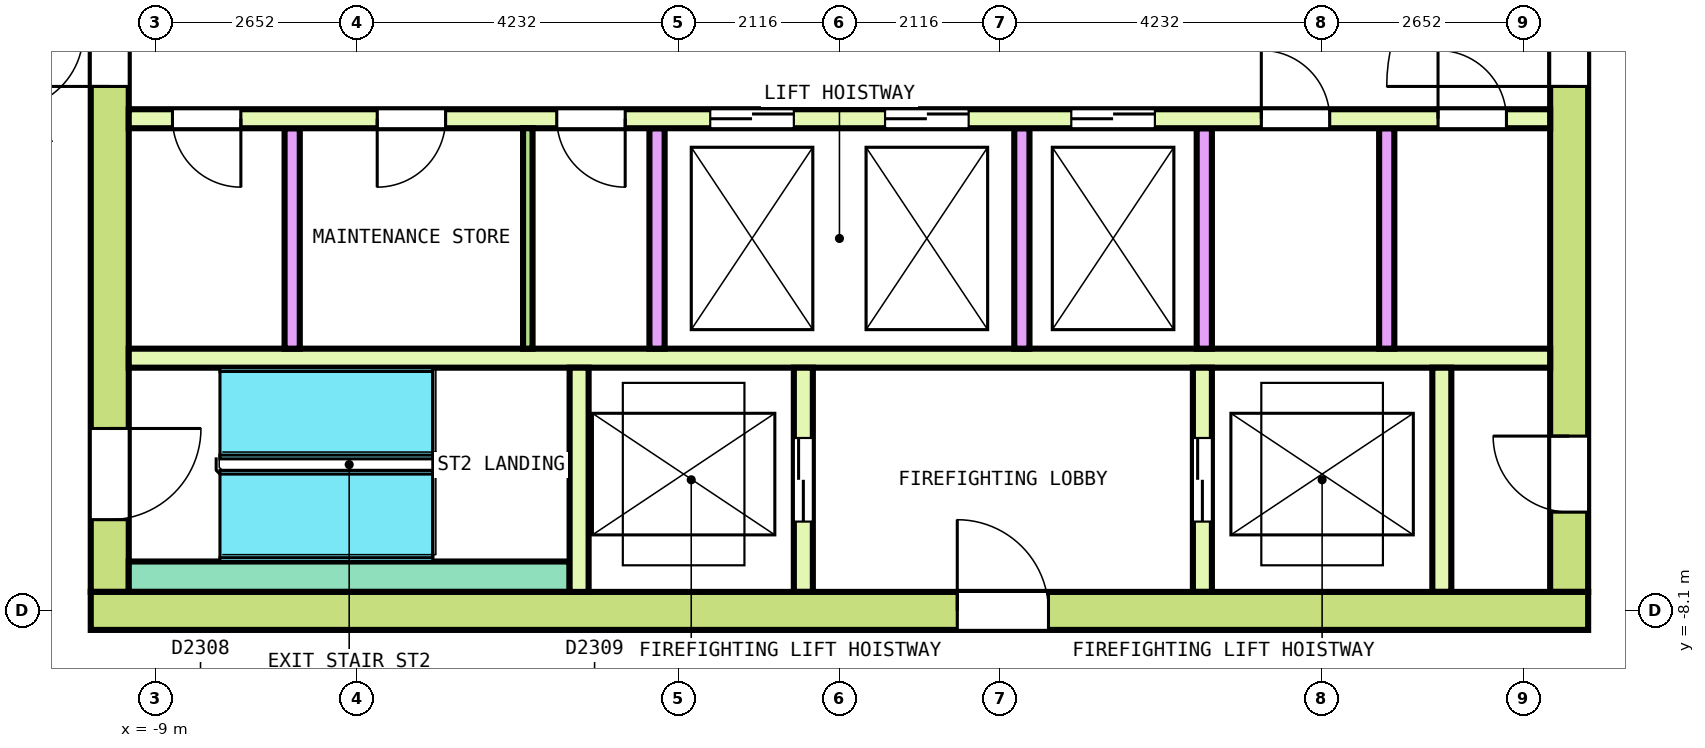
"""IFC4 building model, lengths in metres.
Left out: names, types, materials, properties, quantities, classifications, styles, units other than length and angle.
Written with IfcOpenShell. Run it as: python <this file> out.ifc"""

import sys

from ifc_helpers import new_model, si_unit, direction, frame, frame_2d, origin, place, context, subcontext, project, spatial, rectangle, extrude, element, fill, save


model = new_model("IFC4")
c1 = context("Model", 3, precision=1e-05, world=origin(), true_north=direction((0.0, 1.0)))
c2 = subcontext(c1, "Body", "Model", "MODEL_VIEW")
j1 = project(units=[si_unit("LENGTHUNIT", "METRE"), si_unit("PLANEANGLEUNIT", "RADIAN")], contexts=[c1])
p1 = place(None, origin())
s1 = spatial("IfcSite", under=j1, at=p1, CompositionType="ELEMENT")
p2 = place(p1, origin())
s2 = spatial("IfcBuilding", under=s1, at=p2, CompositionType="ELEMENT")
p3 = place(p2, frame((0.0, 0.0, 312.6)))
s3 = spatial("IfcBuildingStorey", under=s2, at=p3, CompositionType="ELEMENT", Elevation=312.6)
p4 = place(p3, frame((-9.85, -8.1, 0.0), z_axis=(0.0, 0.0, 1.0), x_axis=(1.0, 0.0, 0.0)))
e1 = element("IfcWall", 1, at=p4, inside=s3, PredefinedType="SHEAR", context=c2, shape_type="SweptSolid", body=[
    extrude(rectangle(XDim=19.7, YDim=0.5, at=frame_2d((9.85, 0.0))), origin(), (0.0, 0.0, 1.0), 3.7),
])
p5 = place(p4, frame((11.4, 0.0, 0.0)))
e2 = element("IfcOpeningElement", 2, at=p5, cuts=e1, PredefinedType="OPENING", context=c2, shape_type="SweptSolid", body=[
    extrude(rectangle(XDim=1.2, YDim=2.1, at=frame_2d((0.6, 1.05))), frame((0.0, 0.26, 0.0), z_axis=(0.0, -1.0, 0.0), x_axis=(1.0, 0.0, 0.0)), (0.0, 0.0, 1.0), 0.52),
])
p6 = place(p3, frame((-9.6, -7.85, 0.0), z_axis=(0.0, 0.0, 1.0), x_axis=(0.0, 1.0, 0.0)))
e3 = element("IfcWall", 3, at=p6, inside=s3, PredefinedType="SHEAR", context=c2, shape_type="SweptSolid", body=[
    extrude(rectangle(XDim=15.7, YDim=0.5, at=frame_2d((7.85, 0.0))), origin(), (0.0, 0.0, 1.0), 3.7),
])
p7 = place(p6, frame((6.65, 0.0, 0.0)))
e4 = element("IfcOpeningElement", 4, at=p7, cuts=e3, PredefinedType="OPENING", context=c2, shape_type="SweptSolid", body=[
    extrude(rectangle(XDim=2.4, YDim=2.1, at=frame_2d((1.2, 1.05))), frame((0.0, 0.26, 0.0), z_axis=(0.0, -1.0, 0.0), x_axis=(1.0, 0.0, 0.0)), (0.0, 0.0, 1.0), 0.52),
])
p8 = place(p6, frame((13.55, 0.0, 0.0)))
e5 = element("IfcOpeningElement", 5, at=p8, cuts=e3, PredefinedType="OPENING", context=c2, shape_type="SweptSolid", body=[
    extrude(rectangle(XDim=1.2, YDim=2.1, at=frame_2d((0.6, 1.05))), frame((0.0, 0.26, 0.0), z_axis=(0.0, -1.0, 0.0), x_axis=(1.0, 0.0, 0.0)), (0.0, 0.0, 1.0), 0.52),
])
p9 = place(p6, frame((0.95, 0.0, 0.0)))
e6 = element("IfcOpeningElement", 6, at=p9, cuts=e3, PredefinedType="OPENING", context=c2, shape_type="SweptSolid", body=[
    extrude(rectangle(XDim=1.2, YDim=2.1, at=frame_2d((0.6, 1.05))), frame((0.0, 0.26, 0.0), z_axis=(0.0, -1.0, 0.0), x_axis=(1.0, 0.0, 0.0)), (0.0, 0.0, 1.0), 0.52),
])
p10 = place(p3, frame((9.6, -7.85, 0.0), z_axis=(0.0, 0.0, 1.0), x_axis=(0.0, 1.0, 0.0)))
e7 = element("IfcWall", 7, at=p10, inside=s3, PredefinedType="SHEAR", context=c2, shape_type="SweptSolid", body=[
    extrude(rectangle(XDim=15.7, YDim=0.5, at=frame_2d((7.85, 0.0))), origin(), (0.0, 0.0, 1.0), 3.7),
])
p11 = place(p10, frame((6.65, 0.0, 0.0)))
e8 = element("IfcOpeningElement", 8, at=p11, cuts=e7, PredefinedType="OPENING", context=c2, shape_type="SweptSolid", body=[
    extrude(rectangle(XDim=2.4, YDim=2.1, at=frame_2d((1.2, 1.05))), frame((0.0, 0.26, 0.0), z_axis=(0.0, -1.0, 0.0), x_axis=(1.0, 0.0, 0.0)), (0.0, 0.0, 1.0), 0.52),
])
p12 = place(p10, frame((13.55, 0.0, 0.0)))
e9 = element("IfcOpeningElement", 9, at=p12, cuts=e7, PredefinedType="OPENING", context=c2, shape_type="SweptSolid", body=[
    extrude(rectangle(XDim=1.2, YDim=2.1, at=frame_2d((0.6, 1.05))), frame((0.0, 0.26, 0.0), z_axis=(0.0, -1.0, 0.0), x_axis=(1.0, 0.0, 0.0)), (0.0, 0.0, 1.0), 0.52),
])
p13 = place(p10, frame((1.05, 0.0, 0.0)))
e10 = element("IfcOpeningElement", 10, at=p13, cuts=e7, PredefinedType="OPENING", context=c2, shape_type="SweptSolid", body=[
    extrude(rectangle(XDim=1.0, YDim=2.1, at=frame_2d((0.5, 1.05))), frame((0.0, 0.26, 0.0), z_axis=(0.0, -1.0, 0.0), x_axis=(1.0, 0.0, 0.0)), (0.0, 0.0, 1.0), 0.52),
])
p14 = place(p3, frame((-9.35, -1.625, 0.0), z_axis=(0.0, 0.0, 1.0), x_axis=(1.0, 0.0, 0.0)))
e11 = element("IfcWall", 11, at=p14, inside=s3, PredefinedType="SOLIDWALL", context=c2, shape_type="SweptSolid", body=[
    extrude(rectangle(XDim=18.7, YDim=0.25, at=frame_2d((9.35, 0.0))), origin(), (0.0, 0.0, 1.0), 3.7),
])
p15 = place(p14, frame((7.65, 0.0, 0.0)))
e12 = element("IfcOpeningElement", 12, at=p15, cuts=e11, PredefinedType="OPENING", context=c2, shape_type="SweptSolid", body=[
    extrude(rectangle(XDim=1.1, YDim=2.1, at=frame_2d((0.55, 1.05))), frame((0.0, 0.135, 0.0), z_axis=(0.0, -1.0, 0.0), x_axis=(1.0, 0.0, 0.0)), (0.0, 0.0, 1.0), 0.27),
])
p16 = place(p14, frame((9.95, 0.0, 0.0)))
e13 = element("IfcOpeningElement", 13, at=p16, cuts=e11, PredefinedType="OPENING", context=c2, shape_type="SweptSolid", body=[
    extrude(rectangle(XDim=1.1, YDim=2.1, at=frame_2d((0.55, 1.05))), frame((0.0, 0.135, 0.0), z_axis=(0.0, -1.0, 0.0), x_axis=(1.0, 0.0, 0.0)), (0.0, 0.0, 1.0), 0.27),
])
p17 = place(p14, frame((12.4, 0.0, 0.0)))
e14 = element("IfcOpeningElement", 14, at=p17, cuts=e11, PredefinedType="OPENING", context=c2, shape_type="SweptSolid", body=[
    extrude(rectangle(XDim=1.1, YDim=2.1, at=frame_2d((0.55, 1.05))), frame((0.0, 0.135, 0.0), z_axis=(0.0, -1.0, 0.0), x_axis=(1.0, 0.0, 0.0)), (0.0, 0.0, 1.0), 0.27),
])
p18 = place(p14, frame((0.575, 0.0, 0.0)))
e15 = element("IfcOpeningElement", 15, at=p18, cuts=e11, PredefinedType="OPENING", context=c2, shape_type="SweptSolid", body=[
    extrude(rectangle(XDim=0.9, YDim=2.1, at=frame_2d((0.45, 1.05))), frame((0.0, 0.135, 0.0), z_axis=(0.0, -1.0, 0.0), x_axis=(1.0, 0.0, 0.0)), (0.0, 0.0, 1.0), 0.27),
])
p19 = place(p14, frame((3.269, 0.0, 0.0)))
e16 = element("IfcOpeningElement", 16, at=p19, cuts=e11, PredefinedType="OPENING", context=c2, shape_type="SweptSolid", body=[
    extrude(rectangle(XDim=0.9, YDim=2.1, at=frame_2d((0.45, 1.05))), frame((0.0, 0.135, 0.0), z_axis=(0.0, -1.0, 0.0), x_axis=(1.0, 0.0, 0.0)), (0.0, 0.0, 1.0), 0.27),
])
p20 = place(p14, frame((5.631, 0.0, 0.0)))
e17 = element("IfcOpeningElement", 17, at=p20, cuts=e11, PredefinedType="OPENING", context=c2, shape_type="SweptSolid", body=[
    extrude(rectangle(XDim=0.9, YDim=2.1, at=frame_2d((0.45, 1.05))), frame((0.0, 0.135, 0.0), z_axis=(0.0, -1.0, 0.0), x_axis=(1.0, 0.0, 0.0)), (0.0, 0.0, 1.0), 0.27),
])
p21 = place(p14, frame((14.9, 0.0, 0.0)))
e18 = element("IfcOpeningElement", 18, at=p21, cuts=e11, PredefinedType="OPENING", context=c2, shape_type="SweptSolid", body=[
    extrude(rectangle(XDim=0.9, YDim=2.1, at=frame_2d((0.45, 1.05))), frame((0.0, 0.135, 0.0), z_axis=(0.0, -1.0, 0.0), x_axis=(1.0, 0.0, 0.0)), (0.0, 0.0, 1.0), 0.27),
])
p22 = place(p14, frame((17.225, 0.0, 0.0)))
e19 = element("IfcOpeningElement", 19, at=p22, cuts=e11, PredefinedType="OPENING", context=c2, shape_type="SweptSolid", body=[
    extrude(rectangle(XDim=0.9, YDim=2.1, at=frame_2d((0.45, 1.05))), frame((0.0, 0.135, 0.0), z_axis=(0.0, -1.0, 0.0), x_axis=(1.0, 0.0, 0.0)), (0.0, 0.0, 1.0), 0.27),
])
p23 = place(p3, frame((-9.35, -4.775, 0.0), z_axis=(0.0, 0.0, 1.0), x_axis=(1.0, 0.0, 0.0)))
e20 = element("IfcWall", 20, at=p23, inside=s3, PredefinedType="SOLIDWALL", context=c2, shape_type="SweptSolid", body=[
    extrude(rectangle(XDim=18.7, YDim=0.25, at=frame_2d((9.35, 0.0))), origin(), (0.0, 0.0, 1.0), 3.7),
])
for number, where, z_axis, x_axis in (
    (21, (-7.2, -4.65, 0.0), (0.0, 0.0, 1.0), (0.0, 1.0, 0.0)),
    (22, (-2.4, -4.65, 0.0), (0.0, 0.0, 1.0), (0.0, 1.0, 0.0)),
    (23, (2.4, -4.65, 0.0), (0.0, 0.0, 1.0), (0.0, 1.0, 0.0)),
    (24, (4.8, -4.65, 0.0), (0.0, 0.0, 1.0), (0.0, 1.0, 0.0)),
    (25, (7.2, -4.65, 0.0), (0.0, 0.0, 1.0), (0.0, 1.0, 0.0)),
):
    element("IfcWall", number, at=place(p3, frame(where, z_axis=z_axis, x_axis=x_axis)), inside=s3, PredefinedType="SOLIDWALL", context=c2, shape_type="SweptSolid", body=[
        extrude(rectangle(XDim=2.9, YDim=0.2, at=frame_2d((1.45, 0.0))), origin(), (0.0, 0.0, 1.0), 3.7),
    ])
p24 = place(p3, frame((-9.35, -7.65, 0.0), z_axis=(0.0, 0.0, 1.0), x_axis=(1.0, 0.0, 0.0)))
e26 = element("IfcWall", 26, at=p24, inside=s3, PredefinedType="SOLIDWALL", context=c2, shape_type="SweptSolid", body=[
    extrude(rectangle(XDim=5.8, YDim=0.4, at=frame_2d((2.9, 0.0))), origin(), (0.0, 0.0, 1.0), 3.7),
])
p25 = place(p3, frame((-3.425, -7.85, 0.0), z_axis=(0.0, 0.0, 1.0), x_axis=(0.0, 1.0, 0.0)))
e27 = element("IfcWall", 27, at=p25, inside=s3, PredefinedType="SOLIDWALL", context=c2, shape_type="SweptSolid", body=[
    extrude(rectangle(XDim=2.95, YDim=0.25, at=frame_2d((1.475, 0.0))), origin(), (0.0, 0.0, 1.0), 3.7),
])
p26 = place(p3, frame((-0.475, -7.85, 0.0), z_axis=(0.0, 0.0, 1.0), x_axis=(0.0, 1.0, 0.0)))
e28 = element("IfcWall", 28, at=p26, inside=s3, PredefinedType="SOLIDWALL", context=c2, shape_type="SweptSolid", body=[
    extrude(rectangle(XDim=2.95, YDim=0.25, at=frame_2d((1.475, 0.0))), origin(), (0.0, 0.0, 1.0), 3.7),
])
p27 = place(p26, frame((0.925, 0.0, 0.0)))
e29 = element("IfcOpeningElement", 29, at=p27, cuts=e28, PredefinedType="OPENING", context=c2, shape_type="SweptSolid", body=[
    extrude(rectangle(XDim=1.1, YDim=2.1, at=frame_2d((0.55, 1.05))), frame((0.0, 0.135, 0.0), z_axis=(0.0, -1.0, 0.0), x_axis=(1.0, 0.0, 0.0)), (0.0, 0.0, 1.0), 0.27),
])
p28 = place(p3, frame((4.775, -7.85, 0.0), z_axis=(0.0, 0.0, 1.0), x_axis=(0.0, 1.0, 0.0)))
e30 = element("IfcWall", 30, at=p28, inside=s3, PredefinedType="SOLIDWALL", context=c2, shape_type="SweptSolid", body=[
    extrude(rectangle(XDim=2.95, YDim=0.25, at=frame_2d((1.475, 0.0))), origin(), (0.0, 0.0, 1.0), 3.7),
])
p29 = place(p28, frame((0.925, 0.0, 0.0)))
e31 = element("IfcOpeningElement", 31, at=p29, cuts=e30, PredefinedType="OPENING", context=c2, shape_type="SweptSolid", body=[
    extrude(rectangle(XDim=1.1, YDim=2.1, at=frame_2d((0.55, 1.05))), frame((0.0, 0.135, 0.0), z_axis=(0.0, -1.0, 0.0), x_axis=(1.0, 0.0, 0.0)), (0.0, 0.0, 1.0), 0.27),
])
p30 = place(p3, frame((7.925, -7.85, 0.0), z_axis=(0.0, 0.0, 1.0), x_axis=(0.0, 1.0, 0.0)))
e32 = element("IfcWall", 32, at=p30, inside=s3, PredefinedType="SOLIDWALL", context=c2, shape_type="SweptSolid", body=[
    extrude(rectangle(XDim=2.95, YDim=0.25, at=frame_2d((1.475, 0.0))), origin(), (0.0, 0.0, 1.0), 3.7),
])
p31 = place(p3, frame((-4.1, -4.65, 0.0), z_axis=(0.0, 0.0, 1.0), x_axis=(0.0, 1.0, 0.0)))
e33 = element("IfcWall", 33, at=p31, inside=s3, PredefinedType="PARTITIONING", context=c2, shape_type="SweptSolid", body=[
    extrude(rectangle(XDim=2.9, YDim=0.125, at=frame_2d((1.45, 0.0))), origin(), (0.0, 0.0, 1.0), 3.7),
])
p32 = place(p15, origin())
e34 = element("IfcDoor", 34, at=p32, inside=s3, OperationType="DOUBLE_DOOR_SLIDING", PredefinedType="DOOR", context=c2, shape_type="SweptSolid", body=[
    extrude(rectangle(XDim=1.1, YDim=2.1, at=frame_2d((0.55, 1.05))), frame((0.0, 0.075, 0.0), z_axis=(0.0, -1.0, 0.0), x_axis=(1.0, 0.0, 0.0)), (0.0, 0.0, 1.0), 0.15),
])
fill(e12, e34)
p33 = place(p16, origin())
e35 = element("IfcDoor", 35, at=p33, inside=s3, OperationType="DOUBLE_DOOR_SLIDING", PredefinedType="DOOR", context=c2, shape_type="SweptSolid", body=[
    extrude(rectangle(XDim=1.1, YDim=2.1, at=frame_2d((0.55, 1.05))), frame((0.0, 0.075, 0.0), z_axis=(0.0, -1.0, 0.0), x_axis=(1.0, 0.0, 0.0)), (0.0, 0.0, 1.0), 0.15),
])
fill(e13, e35)
p34 = place(p17, origin())
e36 = element("IfcDoor", 36, at=p34, inside=s3, OperationType="DOUBLE_DOOR_SLIDING", PredefinedType="DOOR", context=c2, shape_type="SweptSolid", body=[
    extrude(rectangle(XDim=1.1, YDim=2.1, at=frame_2d((0.55, 1.05))), frame((0.0, 0.075, 0.0), z_axis=(0.0, -1.0, 0.0), x_axis=(1.0, 0.0, 0.0)), (0.0, 0.0, 1.0), 0.15),
])
fill(e14, e36)
p35 = place(p27, origin())
e37 = element("IfcDoor", 37, at=p35, inside=s3, OperationType="DOUBLE_DOOR_SLIDING", PredefinedType="DOOR", context=c2, shape_type="SweptSolid", body=[
    extrude(rectangle(XDim=1.1, YDim=2.1, at=frame_2d((0.55, 1.05))), frame((0.0, 0.075, 0.0), z_axis=(0.0, -1.0, 0.0), x_axis=(1.0, 0.0, 0.0)), (0.0, 0.0, 1.0), 0.15),
])
fill(e29, e37)
p36 = place(p29, origin())
e38 = element("IfcDoor", 38, at=p36, inside=s3, OperationType="DOUBLE_DOOR_SLIDING", PredefinedType="DOOR", context=c2, shape_type="SweptSolid", body=[
    extrude(rectangle(XDim=1.1, YDim=2.1, at=frame_2d((0.55, 1.05))), frame((0.0, 0.075, 0.0), z_axis=(0.0, -1.0, 0.0), x_axis=(1.0, 0.0, 0.0)), (0.0, 0.0, 1.0), 0.15),
])
fill(e31, e38)
p37 = place(p7, origin())
e39 = element("IfcDoor", 39, at=p37, inside=s3, OperationType="DOUBLE_DOOR_SINGLE_SWING", PredefinedType="DOOR", context=c2, shape_type="SweptSolid", body=[
    extrude(rectangle(XDim=2.4, YDim=2.1, at=frame_2d((1.2, 1.05))), frame((0.0, 0.2, 0.0), z_axis=(0.0, -1.0, 0.0), x_axis=(1.0, 0.0, 0.0)), (0.0, 0.0, 1.0), 0.4),
])
fill(e4, e39)
p38 = place(p11, origin())
e40 = element("IfcDoor", 40, at=p38, inside=s3, OperationType="DOUBLE_DOOR_SINGLE_SWING", PredefinedType="DOOR", context=c2, shape_type="SweptSolid", body=[
    extrude(rectangle(XDim=2.4, YDim=2.1, at=frame_2d((1.2, 1.05))), frame((0.0, 0.2, 0.0), z_axis=(0.0, -1.0, 0.0), x_axis=(1.0, 0.0, 0.0)), (0.0, 0.0, 1.0), 0.4),
])
fill(e8, e40)
p39 = place(p9, origin())
e41 = element("IfcDoor", 41, at=p39, inside=s3, OperationType="SINGLE_SWING_LEFT", PredefinedType="DOOR", context=c2, shape_type="SweptSolid", body=[
    extrude(rectangle(XDim=1.2, YDim=2.1, at=frame_2d((0.6, 1.05))), frame((0.0, 0.2, 0.0), z_axis=(0.0, -1.0, 0.0), x_axis=(1.0, 0.0, 0.0)), (0.0, 0.0, 1.0), 0.4),
])
fill(e6, e41)
p40 = place(p5, origin())
e42 = element("IfcDoor", 42, at=p40, inside=s3, OperationType="SINGLE_SWING_LEFT", PredefinedType="DOOR", context=c2, shape_type="SweptSolid", body=[
    extrude(rectangle(XDim=1.2, YDim=2.1, at=frame_2d((0.6, 1.05))), frame((0.0, 0.2, 0.0), z_axis=(0.0, -1.0, 0.0), x_axis=(1.0, 0.0, 0.0)), (0.0, 0.0, 1.0), 0.4),
])
fill(e2, e42)
p41 = place(p13, origin())
e43 = element("IfcDoor", 43, at=p41, inside=s3, OperationType="SINGLE_SWING_LEFT", PredefinedType="DOOR", context=c2, shape_type="SweptSolid", body=[
    extrude(rectangle(XDim=1.0, YDim=2.1, at=frame_2d((0.5, 1.05))), frame((0.0, 0.2, 0.0), z_axis=(0.0, -1.0, 0.0), x_axis=(1.0, 0.0, 0.0)), (0.0, 0.0, 1.0), 0.4),
])
fill(e10, e43)
p42 = place(p18, origin())
e44 = element("IfcDoor", 44, at=p42, inside=s3, OperationType="SINGLE_SWING_RIGHT", PredefinedType="DOOR", context=c2, shape_type="SweptSolid", body=[
    extrude(rectangle(XDim=0.9, YDim=2.1, at=frame_2d((0.45, 1.05))), frame((0.0, 0.075, 0.0), z_axis=(0.0, -1.0, 0.0), x_axis=(1.0, 0.0, 0.0)), (0.0, 0.0, 1.0), 0.15),
])
fill(e15, e44)
p43 = place(p19, origin())
e45 = element("IfcDoor", 45, at=p43, inside=s3, OperationType="SINGLE_SWING_LEFT", PredefinedType="DOOR", context=c2, shape_type="SweptSolid", body=[
    extrude(rectangle(XDim=0.9, YDim=2.1, at=frame_2d((0.45, 1.05))), frame((0.0, 0.075, 0.0), z_axis=(0.0, -1.0, 0.0), x_axis=(1.0, 0.0, 0.0)), (0.0, 0.0, 1.0), 0.15),
])
fill(e16, e45)
p44 = place(p20, origin())
e46 = element("IfcDoor", 46, at=p44, inside=s3, OperationType="SINGLE_SWING_RIGHT", PredefinedType="DOOR", context=c2, shape_type="SweptSolid", body=[
    extrude(rectangle(XDim=0.9, YDim=2.1, at=frame_2d((0.45, 1.05))), frame((0.0, 0.075, 0.0), z_axis=(0.0, -1.0, 0.0), x_axis=(1.0, 0.0, 0.0)), (0.0, 0.0, 1.0), 0.15),
])
fill(e17, e46)
p45 = place(p21, origin())
e47 = element("IfcDoor", 47, at=p45, inside=s3, OperationType="SINGLE_SWING_LEFT", PredefinedType="DOOR", context=c2, shape_type="SweptSolid", body=[
    extrude(rectangle(XDim=0.9, YDim=2.1, at=frame_2d((0.45, 1.05))), frame((0.0, 0.075, 0.0), z_axis=(0.0, -1.0, 0.0), x_axis=(1.0, 0.0, 0.0)), (0.0, 0.0, 1.0), 0.15),
])
fill(e18, e47)
p46 = place(p22, origin())
e48 = element("IfcDoor", 48, at=p46, inside=s3, OperationType="SINGLE_SWING_RIGHT", PredefinedType="DOOR", context=c2, shape_type="SweptSolid", body=[
    extrude(rectangle(XDim=0.9, YDim=2.1, at=frame_2d((0.45, 1.05))), frame((0.0, 0.075, 0.0), z_axis=(0.0, -1.0, 0.0), x_axis=(1.0, 0.0, 0.0)), (0.0, 0.0, 1.0), 0.15),
])
fill(e19, e48)
save(model, sys.argv[1])
